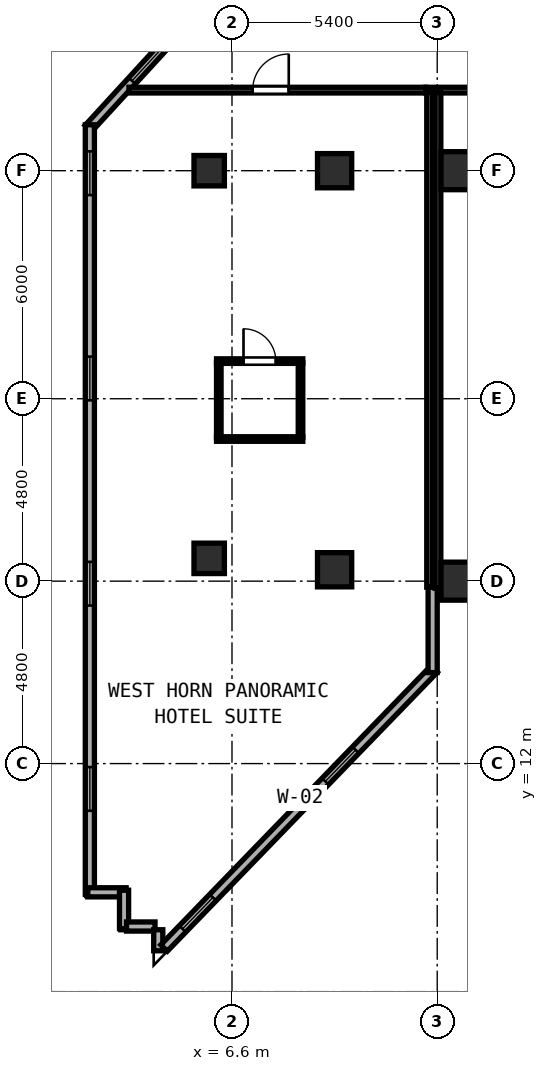
"""IFC4 building model, lengths in metres.
Left out: names, types, materials, properties, quantities, classifications, styles, units other than length and angle.
Written with IfcOpenShell. Run it as: python <this file> out.ifc"""

import sys

from ifc_helpers import new_model, si_unit, direction, frame, frame_2d, origin, origin_2d, place, context, subcontext, project, spatial, rectangle, hollow_rectangle, extrude, element, fill, save


model = new_model("IFC4")
c1 = context("Model", 3, precision=1e-05, world=origin(), true_north=direction((0.0, 1.0)))
c2 = subcontext(c1, "Body", "Model", "MODEL_VIEW")
j1 = project(units=[si_unit("LENGTHUNIT", "METRE"), si_unit("PLANEANGLEUNIT", "RADIAN")], contexts=[c1])
p1 = place(None, origin())
s1 = spatial("IfcSite", under=j1, at=p1, CompositionType="ELEMENT")
p2 = place(p1, origin())
s2 = spatial("IfcBuilding", under=s1, at=p2, CompositionType="ELEMENT")
p3 = place(p2, frame((0.0, 0.0, 106.0)))
s3 = spatial("IfcBuildingStorey", under=s2, at=p3, CompositionType="ELEMENT", Elevation=106.0)
for number, where, z_axis, x_axis in (
    (1, (12.6, 16.8, 0.0), (0.0, 0.0, 1.0), (1.0, 0.0, 0.0)),
    (2, (12.6, 27.6, 0.0), (0.0, 0.0, 1.0), (1.0, 0.0, 0.0)),
):
    element("IfcColumn", number, at=place(p3, frame(where, z_axis=z_axis, x_axis=x_axis)), inside=s3, PredefinedType="COLUMN", context=c2, shape_type="SweptSolid", body=[
        extrude(hollow_rectangle(XDim=1.0, YDim=1.0, WallThickness=0.038, at=origin_2d()), origin(), (0.0, 0.0, 1.0), 3.8),
    ])
for number, where, z_axis, x_axis in (
    (3, (6.0, 17.4, 0.0), (0.0, 0.0, 1.0), (1.0, 0.0, 0.0)),
    (4, (6.0, 27.6, 0.0), (0.0, 0.0, 1.0), (1.0, 0.0, 0.0)),
):
    element("IfcColumn", number, at=place(p3, frame(where, z_axis=z_axis, x_axis=x_axis)), inside=s3, PredefinedType="COLUMN", context=c2, shape_type="SweptSolid", body=[
        extrude(hollow_rectangle(XDim=0.8, YDim=0.8, WallThickness=0.03, at=origin_2d()), origin(), (0.0, 0.0, 1.0), 3.8),
    ])
for number, where, z_axis, x_axis in (
    (5, (9.3, 17.1, 0.0), (0.0, 0.0, 1.0), (1.0, 0.0, 0.0)),
    (6, (9.3, 27.6, 0.0), (0.0, 0.0, 1.0), (1.0, 0.0, 0.0)),
):
    element("IfcColumn", number, at=place(p3, frame(where, z_axis=z_axis, x_axis=x_axis)), inside=s3, PredefinedType="COLUMN", context=c2, shape_type="SweptSolid", body=[
        extrude(hollow_rectangle(XDim=0.9, YDim=0.9, WallThickness=0.034, at=origin_2d()), origin(), (0.0, 0.0, 1.0), 3.8),
    ])
p4 = place(p3, frame((5.045, 31.137, 0.0), z_axis=(0.0, 0.0, 1.0), x_axis=(-0.675778419356, -0.73710482832, 0.0)))
e7 = element("IfcWall", 7, at=p4, inside=s3, PredefinedType="SOLIDWALL", context=c2, shape_type="SweptSolid", body=[
    extrude(rectangle(XDim=3.288, YDim=0.24, at=frame_2d((1.644, 0.0))), origin(), (0.0, 0.0, 1.0), 3.6),
])
p5 = place(p4, frame((0.441, 0.0, 0.85)))
e8 = element("IfcOpeningElement", 8, at=p5, cuts=e7, PredefinedType="OPENING", context=c2, shape_type="SweptSolid", body=[
    extrude(rectangle(XDim=1.15, YDim=1.8, at=frame_2d((0.575, 0.9))), frame((0.0, 0.13, 0.0), z_axis=(0.0, -1.0, 0.0), x_axis=(1.0, 0.0, 0.0)), (0.0, 0.0, 1.0), 0.26),
])
p6 = place(p3, frame((2.86, 28.808, 0.0), z_axis=(0.0, 0.0, 1.0), x_axis=(0.0, -1.0, 0.0)))
e9 = element("IfcWall", 9, at=p6, inside=s3, PredefinedType="SOLIDWALL", context=c2, shape_type="SweptSolid", body=[
    extrude(rectangle(XDim=20.25, YDim=0.24, at=frame_2d((10.125, 0.0))), origin(), (0.0, 0.0, 1.0), 3.6),
])
p7 = place(p6, frame((0.7, 0.0, 0.85)))
e10 = element("IfcOpeningElement", 10, at=p7, cuts=e9, PredefinedType="OPENING", context=c2, shape_type="SweptSolid", body=[
    extrude(rectangle(XDim=1.15, YDim=1.8, at=frame_2d((0.575, 0.9))), frame((0.0, 0.13, 0.0), z_axis=(0.0, -1.0, 0.0), x_axis=(1.0, 0.0, 0.0)), (0.0, 0.0, 1.0), 0.26),
])
p8 = place(p6, frame((6.1, 0.0, 0.85)))
e11 = element("IfcOpeningElement", 11, at=p8, cuts=e9, PredefinedType="OPENING", context=c2, shape_type="SweptSolid", body=[
    extrude(rectangle(XDim=1.15, YDim=1.8, at=frame_2d((0.575, 0.9))), frame((0.0, 0.13, 0.0), z_axis=(0.0, -1.0, 0.0), x_axis=(1.0, 0.0, 0.0)), (0.0, 0.0, 1.0), 0.26),
])
p9 = place(p6, frame((11.5, 0.0, 0.85)))
e12 = element("IfcOpeningElement", 12, at=p9, cuts=e9, PredefinedType="OPENING", context=c2, shape_type="SweptSolid", body=[
    extrude(rectangle(XDim=1.15, YDim=1.8, at=frame_2d((0.575, 0.9))), frame((0.0, 0.13, 0.0), z_axis=(0.0, -1.0, 0.0), x_axis=(1.0, 0.0, 0.0)), (0.0, 0.0, 1.0), 0.26),
])
p10 = place(p6, frame((16.9, 0.0, 0.85)))
e13 = element("IfcOpeningElement", 13, at=p10, cuts=e9, PredefinedType="OPENING", context=c2, shape_type="SweptSolid", body=[
    extrude(rectangle(XDim=1.15, YDim=1.8, at=frame_2d((0.575, 0.9))), frame((0.0, 0.13, 0.0), z_axis=(0.0, -1.0, 0.0), x_axis=(1.0, 0.0, 0.0)), (0.0, 0.0, 1.0), 0.26),
])
for number, where, z_axis, x_axis in (
    (14, (2.805, 8.613, 0.0), (0.0, 0.0, 1.0), (1.0, 0.0, 0.0)),
    (15, (3.76, 8.668, 0.0), (0.0, 0.0, 1.0), (0.0, -1.0, 0.0)),
):
    element("IfcWall", number, at=place(p3, frame(where, z_axis=z_axis, x_axis=x_axis)), inside=s3, PredefinedType="SOLIDWALL", context=c2, shape_type="SweptSolid", body=[
        extrude(rectangle(XDim=1.01, YDim=0.24, at=frame_2d((0.505, 0.0))), origin(), (0.0, 0.0, 1.0), 3.6),
    ])
p11 = place(p3, frame((3.825, 7.713, 0.0), z_axis=(0.0, 0.0, 1.0), x_axis=(1.0, 0.0, 0.0)))
e16 = element("IfcWall", 16, at=p11, inside=s3, PredefinedType="SOLIDWALL", context=c2, shape_type="SweptSolid", body=[
    extrude(rectangle(XDim=0.75, YDim=0.24, at=frame_2d((0.375, 0.0))), origin(), (0.0, 0.0, 1.0), 3.6),
])
p12 = place(p3, frame((4.66, 7.628, 0.0), z_axis=(0.0, 0.0, 1.0), x_axis=(0.0, -1.0, 0.0)))
e17 = element("IfcWall", 17, at=p12, inside=s3, PredefinedType="SOLIDWALL", context=c2, shape_type="SweptSolid", body=[
    extrude(rectangle(XDim=0.553, YDim=0.24, at=frame_2d((0.277, 0.0))), origin(), (0.0, 0.0, 1.0), 3.6),
])
p13 = place(p3, frame((4.813, 7.148, 0.0), z_axis=(0.0, 0.0, 1.0), x_axis=(0.695506215319, 0.718520079366, 0.0)))
e18 = element("IfcWall", 18, at=p13, inside=s3, PredefinedType="SOLIDWALL", context=c2, shape_type="SweptSolid", body=[
    extrude(rectangle(XDim=10.216, YDim=0.24, at=frame_2d((5.108, 0.0))), origin(), (0.0, 0.0, 1.0), 3.6),
])
p14 = place(p13, frame((0.7, 0.0, 0.85)))
e19 = element("IfcOpeningElement", 19, at=p14, cuts=e18, PredefinedType="OPENING", context=c2, shape_type="SweptSolid", body=[
    extrude(rectangle(XDim=1.15, YDim=1.8, at=frame_2d((0.575, 0.9))), frame((0.0, 0.13, 0.0), z_axis=(0.0, -1.0, 0.0), x_axis=(1.0, 0.0, 0.0)), (0.0, 0.0, 1.0), 0.26),
])
p15 = place(p13, frame((6.1, 0.0, 0.85)))
e20 = element("IfcOpeningElement", 20, at=p15, cuts=e18, PredefinedType="OPENING", context=c2, shape_type="SweptSolid", body=[
    extrude(rectangle(XDim=1.15, YDim=1.8, at=frame_2d((0.575, 0.9))), frame((0.0, 0.13, 0.0), z_axis=(0.0, -1.0, 0.0), x_axis=(1.0, 0.0, 0.0)), (0.0, 0.0, 1.0), 0.26),
])
p16 = place(p3, frame((11.88, 14.394, 0.0), z_axis=(0.0, 0.0, 1.0), x_axis=(0.0, 1.0, 0.0)))
e21 = element("IfcWall", 21, at=p16, inside=s3, PredefinedType="SOLIDWALL", context=c2, shape_type="SweptSolid", body=[
    extrude(rectangle(XDim=2.246, YDim=0.24, at=frame_2d((1.123, 0.0))), origin(), (0.0, 0.0, 1.0), 3.6),
])
p17 = place(p3, frame((11.7, 29.72, 0.0), z_axis=(0.0, 0.0, 1.0), x_axis=(1.0, 0.0, 0.0)))
e22 = element("IfcWall", 22, at=p17, inside=s3, PredefinedType="PARTITIONING", context=c2, shape_type="SweptSolid", body=[
    extrude(rectangle(XDim=5.81, YDim=0.15, at=frame_2d((2.905, 0.0))), origin(), (0.0, 0.0, 1.0), 3.6),
])
p18 = place(p17, frame((5.488, 0.0, 0.0), z_axis=(0.0, 0.0, 1.0), x_axis=(-1.0, 0.0, 0.0)))
e23 = element("IfcOpeningElement", 23, at=p18, cuts=e22, PredefinedType="OPENING", context=c2, shape_type="SweptSolid", body=[
    extrude(rectangle(XDim=0.95, YDim=2.18, at=frame_2d((0.475, 1.09))), frame((0.0, 0.085, 0.0), z_axis=(0.0, -1.0, 0.0), x_axis=(1.0, 0.0, 0.0)), (0.0, 0.0, 1.0), 0.17),
])
p19 = place(p3, frame((11.8, 16.642, 0.0), z_axis=(0.0, 0.0, 1.0), x_axis=(0.0, 1.0, 0.0)))
e24 = element("IfcWall", 24, at=p19, inside=s3, PredefinedType="PARTITIONING", context=c2, shape_type="SweptSolid", body=[
    extrude(rectangle(XDim=13.018, YDim=0.15, at=frame_2d((6.509, 0.0))), origin(), (0.0, 0.0, 1.0), 3.6),
])
p20 = place(p3, frame((3.889, 29.72, 0.0), z_axis=(0.0, 0.0, 1.0), x_axis=(1.0, 0.0, 0.0)))
e25 = element("IfcWall", 25, at=p20, inside=s3, PredefinedType="PARTITIONING", context=c2, shape_type="SweptSolid", body=[
    extrude(rectangle(XDim=7.809, YDim=0.15, at=frame_2d((3.905, 0.0))), origin(), (0.0, 0.0, 1.0), 3.6),
])
p21 = place(p20, frame((4.205, 0.0, 0.0), z_axis=(0.0, 0.0, 1.0), x_axis=(-1.0, 0.0, 0.0)))
e26 = element("IfcOpeningElement", 26, at=p21, cuts=e25, PredefinedType="OPENING", context=c2, shape_type="SweptSolid", body=[
    extrude(rectangle(XDim=0.95, YDim=2.18, at=frame_2d((0.475, 1.09))), frame((0.0, 0.085, 0.0), z_axis=(0.0, -1.0, 0.0), x_axis=(1.0, 0.0, 0.0)), (0.0, 0.0, 1.0), 0.17),
])
p22 = place(p3, frame((12.02, 16.612, 0.0), z_axis=(0.0, 0.0, 1.0), x_axis=(0.0, 1.0, 0.0)))
e27 = element("IfcWall", 27, at=p22, inside=s3, PredefinedType="PARTITIONING", context=c2, shape_type="SweptSolid", body=[
    extrude(rectangle(XDim=13.048, YDim=0.15, at=frame_2d((6.524, 0.0))), origin(), (0.0, 0.0, 1.0), 3.6),
])
p23 = place(p3, frame((6.193, 22.59, 0.0), z_axis=(0.0, 0.0, 1.0), x_axis=(1.0, 0.0, 0.0)))
e28 = element("IfcWall", 28, at=p23, inside=s3, PredefinedType="PARTITIONING", context=c2, shape_type="SweptSolid", body=[
    extrude(rectangle(XDim=2.27, YDim=0.12, at=frame_2d((1.135, 0.0))), origin(), (0.0, 0.0, 1.0), 3.6),
])
p24 = place(p23, frame((1.56, 0.0, 0.0), z_axis=(0.0, 0.0, 1.0), x_axis=(-1.0, 0.0, 0.0)))
e29 = element("IfcOpeningElement", 29, at=p24, cuts=e28, PredefinedType="OPENING", context=c2, shape_type="SweptSolid", body=[
    extrude(rectangle(XDim=0.85, YDim=2.1, at=frame_2d((0.425, 1.05))), frame((0.0, 0.07, 0.0), z_axis=(0.0, -1.0, 0.0), x_axis=(1.0, 0.0, 0.0)), (0.0, 0.0, 1.0), 0.14),
])
p25 = place(p3, frame((6.193, 20.54, 0.0), z_axis=(0.0, 0.0, 1.0), x_axis=(1.0, 0.0, 0.0)))
e30 = element("IfcWall", 30, at=p25, inside=s3, PredefinedType="PARTITIONING", context=c2, shape_type="SweptSolid", body=[
    extrude(rectangle(XDim=2.27, YDim=0.12, at=frame_2d((1.135, 0.0))), origin(), (0.0, 0.0, 1.0), 3.6),
])
for number, where, z_axis, x_axis in (
    (31, (6.253, 20.585, 0.0), (0.0, 0.0, 1.0), (0.0, 1.0, 0.0)),
    (32, (8.403, 20.585, 0.0), (0.0, 0.0, 1.0), (0.0, 1.0, 0.0)),
):
    element("IfcWall", number, at=place(p3, frame(where, z_axis=z_axis, x_axis=x_axis)), inside=s3, PredefinedType="PARTITIONING", context=c2, shape_type="SweptSolid", body=[
        extrude(rectangle(XDim=1.96, YDim=0.12, at=frame_2d((0.98, 0.0))), origin(), (0.0, 0.0, 1.0), 3.6),
    ])
p26 = place(p5, origin())
e33 = element("IfcWindow", 33, at=p26, inside=s3, PartitioningType="SINGLE_PANEL", PredefinedType="WINDOW", context=c2, shape_type="SweptSolid", body=[
    extrude(rectangle(XDim=1.15, YDim=1.8, at=frame_2d((0.575, 0.9))), frame((0.0, 0.03, 0.0), z_axis=(0.0, -1.0, 0.0), x_axis=(1.0, 0.0, 0.0)), (0.0, 0.0, 1.0), 0.06),
])
fill(e8, e33)
p27 = place(p7, origin())
e34 = element("IfcWindow", 34, at=p27, inside=s3, PartitioningType="SINGLE_PANEL", PredefinedType="WINDOW", context=c2, shape_type="SweptSolid", body=[
    extrude(rectangle(XDim=1.15, YDim=1.8, at=frame_2d((0.575, 0.9))), frame((0.0, 0.03, 0.0), z_axis=(0.0, -1.0, 0.0), x_axis=(1.0, 0.0, 0.0)), (0.0, 0.0, 1.0), 0.06),
])
fill(e10, e34)
p28 = place(p8, origin())
e35 = element("IfcWindow", 35, at=p28, inside=s3, PartitioningType="SINGLE_PANEL", PredefinedType="WINDOW", context=c2, shape_type="SweptSolid", body=[
    extrude(rectangle(XDim=1.15, YDim=1.8, at=frame_2d((0.575, 0.9))), frame((0.0, 0.03, 0.0), z_axis=(0.0, -1.0, 0.0), x_axis=(1.0, 0.0, 0.0)), (0.0, 0.0, 1.0), 0.06),
])
fill(e11, e35)
p29 = place(p9, origin())
e36 = element("IfcWindow", 36, at=p29, inside=s3, PartitioningType="SINGLE_PANEL", PredefinedType="WINDOW", context=c2, shape_type="SweptSolid", body=[
    extrude(rectangle(XDim=1.15, YDim=1.8, at=frame_2d((0.575, 0.9))), frame((0.0, 0.03, 0.0), z_axis=(0.0, -1.0, 0.0), x_axis=(1.0, 0.0, 0.0)), (0.0, 0.0, 1.0), 0.06),
])
fill(e12, e36)
p30 = place(p10, origin())
e37 = element("IfcWindow", 37, at=p30, inside=s3, PartitioningType="SINGLE_PANEL", PredefinedType="WINDOW", context=c2, shape_type="SweptSolid", body=[
    extrude(rectangle(XDim=1.15, YDim=1.8, at=frame_2d((0.575, 0.9))), frame((0.0, 0.03, 0.0), z_axis=(0.0, -1.0, 0.0), x_axis=(1.0, 0.0, 0.0)), (0.0, 0.0, 1.0), 0.06),
])
fill(e13, e37)
p31 = place(p14, origin())
e38 = element("IfcWindow", 38, at=p31, inside=s3, PartitioningType="SINGLE_PANEL", PredefinedType="WINDOW", context=c2, shape_type="SweptSolid", body=[
    extrude(rectangle(XDim=1.15, YDim=1.8, at=frame_2d((0.575, 0.9))), frame((0.0, 0.03, 0.0), z_axis=(0.0, -1.0, 0.0), x_axis=(1.0, 0.0, 0.0)), (0.0, 0.0, 1.0), 0.06),
])
fill(e19, e38)
p32 = place(p15, origin())
e39 = element("IfcWindow", 39, at=p32, inside=s3, PartitioningType="SINGLE_PANEL", PredefinedType="WINDOW", context=c2, shape_type="SweptSolid", body=[
    extrude(rectangle(XDim=1.15, YDim=1.8, at=frame_2d((0.575, 0.9))), frame((0.0, 0.03, 0.0), z_axis=(0.0, -1.0, 0.0), x_axis=(1.0, 0.0, 0.0)), (0.0, 0.0, 1.0), 0.06),
])
fill(e20, e39)
p33 = place(p21, origin())
e40 = element("IfcDoor", 40, at=p33, inside=s3, OperationType="SINGLE_SWING_LEFT", PredefinedType="DOOR", context=c2, shape_type="SweptSolid", body=[
    extrude(rectangle(XDim=0.95, YDim=2.18, at=frame_2d((0.475, 1.09))), frame((0.0, 0.025, 0.0), z_axis=(0.0, -1.0, 0.0), x_axis=(1.0, 0.0, 0.0)), (0.0, 0.0, 1.0), 0.05),
])
fill(e26, e40)
p34 = place(p24, origin())
e41 = element("IfcDoor", 41, at=p34, inside=s3, OperationType="SINGLE_SWING_RIGHT", PredefinedType="DOOR", context=c2, shape_type="SweptSolid", body=[
    extrude(rectangle(XDim=0.85, YDim=2.1, at=frame_2d((0.425, 1.05))), frame((0.0, 0.025, 0.0), z_axis=(0.0, -1.0, 0.0), x_axis=(1.0, 0.0, 0.0)), (0.0, 0.0, 1.0), 0.05),
])
fill(e29, e41)
save(model, sys.argv[1])
